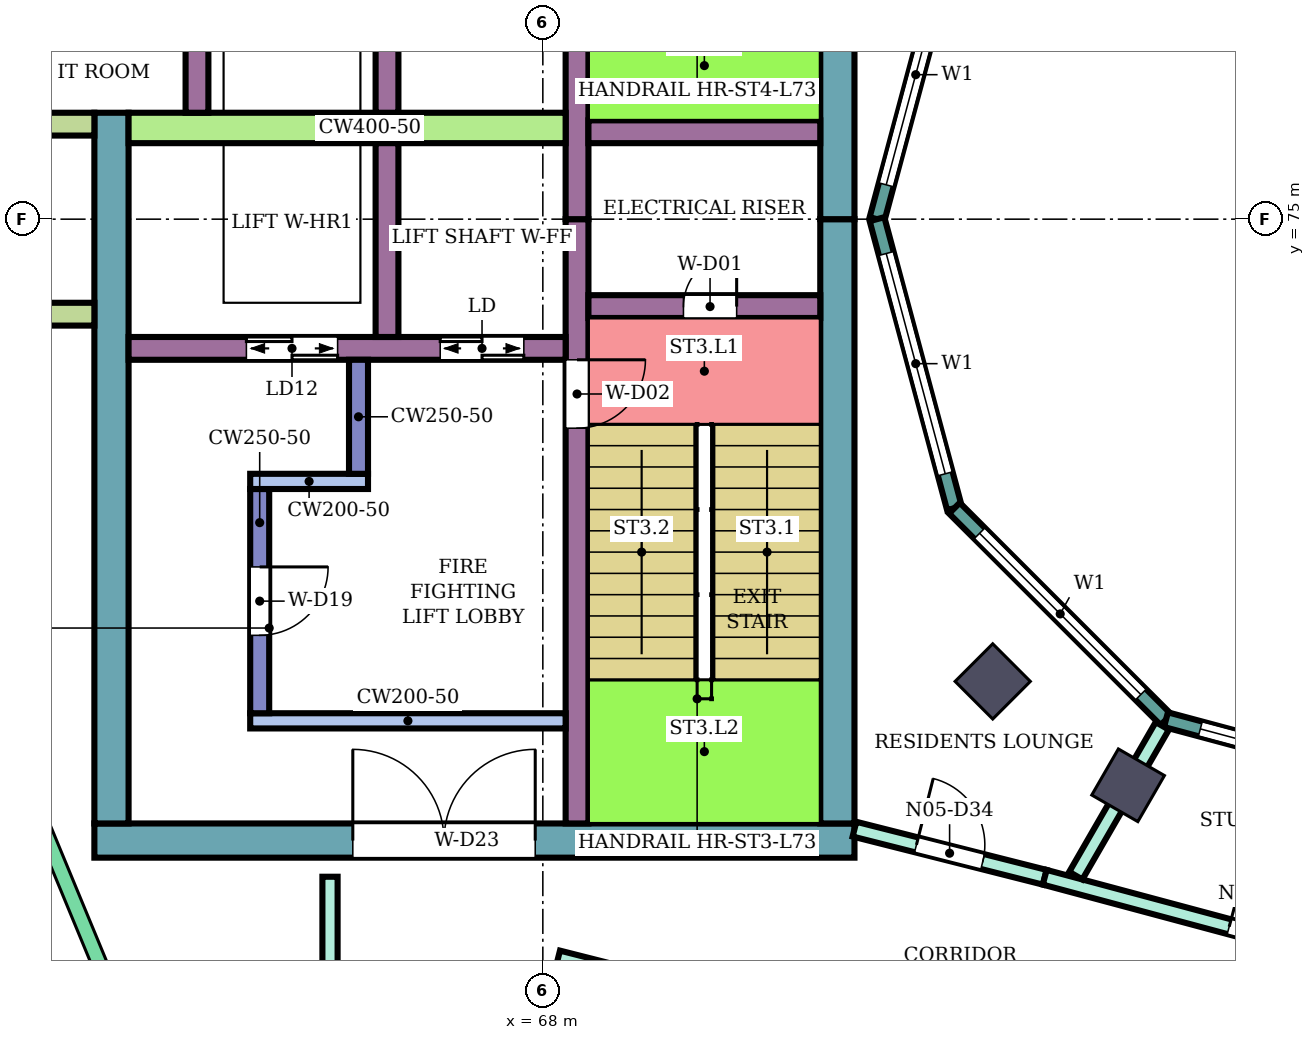
"""IFC4 building model, lengths in metres.
Left out: names, types, materials, properties, quantities, classifications, styles, units other than length and angle.
Written with IfcOpenShell. Run it as: python <this file> out.ifc"""

import sys

from ifc_helpers import new_model, si_unit, direction, frame, frame_2d, origin, origin_2d, place, context, subcontext, project, spatial, rectangle, extrude, element, fill, save


model = new_model("IFC4")
c1 = context("Model", 3, precision=1e-05, world=origin(), true_north=direction((0.0, 1.0)))
c2 = subcontext(c1, "Body", "Model", "MODEL_VIEW")
j1 = project(units=[si_unit("LENGTHUNIT", "METRE"), si_unit("PLANEANGLEUNIT", "RADIAN")], contexts=[c1])
p1 = place(None, origin())
s1 = spatial("IfcSite", under=j1, at=p1, CompositionType="ELEMENT")
p2 = place(p1, origin())
s2 = spatial("IfcBuilding", under=s1, at=p2, CompositionType="ELEMENT")
p3 = place(p2, frame((0.0, 0.0, 319.3)))
s3 = spatial("IfcBuildingStorey", under=s2, at=p3, CompositionType="ELEMENT", Elevation=319.3)
for number, where, z_axis, x_axis in (
    (1, (73.919, 68.919, 0.0), (0.0, 0.0, 1.0), (-0.707, -0.707, 0.0)),
    (2, (75.7, 67.552, 0.0), (0.0, 0.0, 1.0), (-0.5, -0.866, 0.0)),
):
    element("IfcColumn", number, at=place(p3, frame(where, z_axis=z_axis, x_axis=x_axis)), inside=s3, PredefinedType="COLUMN", context=c2, shape_type="SweptSolid", body=[
        extrude(rectangle(XDim=0.7, YDim=0.7, at=origin_2d()), origin(), (0.0, 0.0, 1.0), 4.4),
    ])
p4 = place(p3, frame((72.1, 66.825, 0.0), z_axis=(0.0, 0.0, 1.0), x_axis=(-1.0, 0.0, 0.0)))
e3 = element("IfcWall", 3, at=p4, inside=s3, PredefinedType="SHEAR", context=c2, shape_type="SweptSolid", body=[
    extrude(rectangle(XDim=10.0, YDim=0.45, at=frame_2d((5.0, 0.0))), origin(), (0.0, 0.0, 1.0), 4.08),
])
p5 = place(p4, frame((4.2, 0.0, 0.0)))
e4 = element("IfcOpeningElement", 4, at=p5, cuts=e3, PredefinedType="OPENING", context=c2, shape_type="SweptSolid", body=[
    extrude(rectangle(XDim=2.4, YDim=2.4, at=frame_2d((1.2, 1.2))), frame((0.0, 0.235, 0.0), z_axis=(0.0, -1.0, 0.0), x_axis=(1.0, 0.0, 0.0)), (0.0, 0.0, 1.0), 0.47),
])
for number, where, z_axis, x_axis in (
    (5, (71.875, 75.0, 0.0), (0.0, 0.0, 1.0), (0.0, -1.0, 0.0)),
    (6, (71.875, 82.95, 0.0), (0.0, 0.0, 1.0), (0.0, -1.0, 0.0)),
):
    element("IfcWall", number, at=place(p3, frame(where, z_axis=z_axis, x_axis=x_axis)), inside=s3, PredefinedType="SHEAR", context=c2, shape_type="SweptSolid", body=[
        extrude(rectangle(XDim=7.95, YDim=0.45, at=frame_2d((3.975, 0.0))), origin(), (0.0, 0.0, 1.0), 4.08),
    ])
p6 = place(p3, frame((62.325, 76.4, 0.0), z_axis=(0.0, 0.0, 1.0), x_axis=(0.0, -1.0, 0.0)))
e7 = element("IfcWall", 7, at=p6, inside=s3, PredefinedType="SHEAR", context=c2, shape_type="SweptSolid", body=[
    extrude(rectangle(XDim=9.35, YDim=0.45, at=frame_2d((4.675, 0.0))), origin(), (0.0, 0.0, 1.0), 4.08),
])
p7 = place(p3, frame((68.45, 75.0, 0.0), z_axis=(0.0, 0.0, 1.0), x_axis=(0.0, -1.0, 0.0)))
e8 = element("IfcWall", 8, at=p7, inside=s3, PredefinedType="SHEAR", context=c2, shape_type="SweptSolid", body=[
    extrude(rectangle(XDim=7.95, YDim=0.3, at=frame_2d((3.975, 0.0))), origin(), (0.0, 0.0, 1.0), 4.08),
])
p8 = place(p7, frame((1.85, 0.0, 0.0)))
e9 = element("IfcOpeningElement", 9, at=p8, cuts=e8, PredefinedType="OPENING", context=c2, shape_type="SweptSolid", body=[
    extrude(rectangle(XDim=0.9, YDim=2.1, at=frame_2d((0.45, 1.05))), frame((0.0, 0.16, 0.0), z_axis=(0.0, -1.0, 0.0), x_axis=(1.0, 0.0, 0.0)), (0.0, 0.0, 1.0), 0.32),
])
p9 = place(p3, frame((68.45, 82.95, 0.0), z_axis=(0.0, 0.0, 1.0), x_axis=(0.0, -1.0, 0.0)))
e10 = element("IfcWall", 10, at=p9, inside=s3, PredefinedType="SHEAR", context=c2, shape_type="SweptSolid", body=[
    extrude(rectangle(XDim=7.95, YDim=0.3, at=frame_2d((3.975, 0.0))), origin(), (0.0, 0.0, 1.0), 4.08),
])
p10 = place(p9, frame((0.6, 0.0, 0.0)))
e11 = element("IfcOpeningElement", 11, at=p10, cuts=e10, PredefinedType="OPENING", context=c2, shape_type="SweptSolid", body=[
    extrude(rectangle(XDim=0.9, YDim=2.1, at=frame_2d((0.45, 1.05))), frame((0.0, 0.16, 0.0), z_axis=(0.0, -1.0, 0.0), x_axis=(1.0, 0.0, 0.0)), (0.0, 0.0, 1.0), 0.32),
])
p11 = place(p3, frame((71.65, 73.85, 0.0), z_axis=(0.0, 0.0, 1.0), x_axis=(-1.0, 0.0, 0.0)))
e12 = element("IfcWall", 12, at=p11, inside=s3, PredefinedType="SHEAR", context=c2, shape_type="SweptSolid", body=[
    extrude(rectangle(XDim=3.05, YDim=0.3, at=frame_2d((1.525, 0.0))), origin(), (0.0, 0.0, 1.0), 4.08),
])
p12 = place(p11, frame((1.1, 0.0, 0.0)))
e13 = element("IfcOpeningElement", 13, at=p12, cuts=e12, PredefinedType="OPENING", context=c2, shape_type="SweptSolid", body=[
    extrude(rectangle(XDim=0.7, YDim=2.0, at=frame_2d((0.35, 1.0))), frame((0.0, 0.16, 0.0), z_axis=(0.0, -1.0, 0.0), x_axis=(1.0, 0.0, 0.0)), (0.0, 0.0, 1.0), 0.32),
])
p13 = place(p3, frame((71.65, 76.15, 0.0), z_axis=(0.0, 0.0, 1.0), x_axis=(-1.0, 0.0, 0.0)))
e14 = element("IfcWall", 14, at=p13, inside=s3, PredefinedType="SHEAR", context=c2, shape_type="SweptSolid", body=[
    extrude(rectangle(XDim=3.05, YDim=0.3, at=frame_2d((1.525, 0.0))), origin(), (0.0, 0.0, 1.0), 4.08),
])
p14 = place(p3, frame((68.3, 73.3, 0.0), z_axis=(0.0, 0.0, 1.0), x_axis=(-1.0, 0.0, 0.0)))
e15 = element("IfcWall", 15, at=p14, inside=s3, PredefinedType="SHEAR", context=c2, shape_type="SweptSolid", body=[
    extrude(rectangle(XDim=5.75, YDim=0.3, at=frame_2d((2.875, 0.0))), origin(), (0.0, 0.0, 1.0), 4.08),
])
p15 = place(p14, frame((0.55, 0.0, 0.0)))
e16 = element("IfcOpeningElement", 16, at=p15, cuts=e15, PredefinedType="OPENING", context=c2, shape_type="SweptSolid", body=[
    extrude(rectangle(XDim=1.1, YDim=2.1, at=frame_2d((0.55, 1.05))), frame((0.0, 0.16, 0.0), z_axis=(0.0, -1.0, 0.0), x_axis=(1.0, 0.0, 0.0)), (0.0, 0.0, 1.0), 0.32),
])
p16 = place(p14, frame((3.0, 0.0, 0.0)))
e17 = element("IfcOpeningElement", 17, at=p16, cuts=e15, PredefinedType="OPENING", context=c2, shape_type="SweptSolid", body=[
    extrude(rectangle(XDim=1.2, YDim=2.1, at=frame_2d((0.6, 1.05))), frame((0.0, 0.16, 0.0), z_axis=(0.0, -1.0, 0.0), x_axis=(1.0, 0.0, 0.0)), (0.0, 0.0, 1.0), 0.32),
])
p17 = place(p3, frame((68.3, 76.2, 0.0), z_axis=(0.0, 0.0, 1.0), x_axis=(-1.0, 0.0, 0.0)))
e18 = element("IfcWall", 18, at=p17, inside=s3, PredefinedType="SHEAR", context=c2, shape_type="SweptSolid", body=[
    extrude(rectangle(XDim=5.75, YDim=0.4, at=frame_2d((2.875, 0.0))), origin(), (0.0, 0.0, 1.0), 4.08),
])
for number, where, z_axis, x_axis in (
    (19, (65.95, 76.0, 0.0), (0.0, 0.0, 1.0), (0.0, -1.0, 0.0)),
    (20, (65.95, 78.95, 0.0), (0.0, 0.0, 1.0), (0.0, -1.0, 0.0)),
    (21, (63.45, 78.95, 0.0), (0.0, 0.0, 1.0), (0.0, -1.0, 0.0)),
):
    element("IfcWall", number, at=place(p3, frame(where, z_axis=z_axis, x_axis=x_axis)), inside=s3, PredefinedType="SHEAR", context=c2, shape_type="SweptSolid", body=[
        extrude(rectangle(XDim=2.55, YDim=0.3, at=frame_2d((1.275, 0.0))), origin(), (0.0, 0.0, 1.0), 4.08),
    ])
p18 = place(p3, frame((68.3, 68.4, 0.0), z_axis=(0.0, 0.0, 1.0), x_axis=(-1.0, 0.0, 0.0)))
e22 = element("IfcWall", 22, at=p18, inside=s3, PredefinedType="SHEAR", context=c2, shape_type="SweptSolid", body=[
    extrude(rectangle(XDim=4.15, YDim=0.2, at=frame_2d((2.075, 0.0))), origin(), (0.0, 0.0, 1.0), 4.08),
])
p19 = place(p3, frame((64.275, 71.45, 0.0), z_axis=(0.0, 0.0, 1.0), x_axis=(0.0, -1.0, 0.0)))
e23 = element("IfcWall", 23, at=p19, inside=s3, PredefinedType="SHEAR", context=c2, shape_type="SweptSolid", body=[
    extrude(rectangle(XDim=2.95, YDim=0.25, at=frame_2d((1.475, 0.0))), origin(), (0.0, 0.0, 1.0), 4.08),
])
p20 = place(p19, frame((1.025, 0.0, 0.0)))
e24 = element("IfcOpeningElement", 24, at=p20, cuts=e23, PredefinedType="OPENING", context=c2, shape_type="SweptSolid", body=[
    extrude(rectangle(XDim=0.9, YDim=2.1, at=frame_2d((0.45, 1.05))), frame((0.0, 0.135, 0.0), z_axis=(0.0, -1.0, 0.0), x_axis=(1.0, 0.0, 0.0)), (0.0, 0.0, 1.0), 0.27),
])
p21 = place(p3, frame((65.7, 71.55, 0.0), z_axis=(0.0, 0.0, 1.0), x_axis=(-1.0, 0.0, 0.0)))
e25 = element("IfcWall", 25, at=p21, inside=s3, PredefinedType="SHEAR", context=c2, shape_type="SweptSolid", body=[
    extrude(rectangle(XDim=1.55, YDim=0.2, at=frame_2d((0.775, 0.0))), origin(), (0.0, 0.0, 1.0), 4.08),
])
p22 = place(p3, frame((65.575, 73.15, 0.0), z_axis=(0.0, 0.0, 1.0), x_axis=(0.0, -1.0, 0.0)))
e26 = element("IfcWall", 26, at=p22, inside=s3, PredefinedType="SHEAR", context=c2, shape_type="SweptSolid", body=[
    extrude(rectangle(XDim=1.5, YDim=0.25, at=frame_2d((0.75, 0.0))), origin(), (0.0, 0.0, 1.0), 4.08),
])
for number, where, z_axis, x_axis in (
    (27, (62.1, 76.25, 0.0), (0.0, 0.0, 1.0), (-1.0, 0.0, 0.0)),
    (28, (62.1, 73.75, 0.0), (0.0, 0.0, 1.0), (-1.0, 0.0, 0.0)),
):
    element("IfcWall", number, at=place(p3, frame(where, z_axis=z_axis, x_axis=x_axis)), inside=s3, PredefinedType="NOTDEFINED", context=c2, shape_type="SweptSolid", body=[
        extrude(rectangle(XDim=2.416, YDim=0.3, at=frame_2d((1.208, 0.0))), origin(), (0.0, 0.0, 1.0), 4.4),
    ])
p23 = place(p3, frame((73.415, 78.802, 0.0), z_axis=(0.0, 0.0, 1.0), x_axis=(-0.258789828301, -0.965933654434, 0.0)))
e29 = element("IfcWall", 29, at=p23, inside=s3, PredefinedType="NOTDEFINED", context=c2, shape_type="SweptSolid", body=[
    extrude(rectangle(XDim=3.936, YDim=0.2, at=frame_2d((1.968, 0.0))), origin(), (0.0, 0.0, 1.0), 4.4),
])
p24 = place(p23, frame((0.468, 0.0, 0.9)))
e30 = element("IfcOpeningElement", 30, at=p24, cuts=e29, PredefinedType="OPENING", context=c2, shape_type="SweptSolid", body=[
    extrude(rectangle(XDim=3.0, YDim=2.3, at=frame_2d((1.5, 1.15))), frame((0.0, 0.11, 0.0), z_axis=(0.0, -1.0, 0.0), x_axis=(1.0, 0.0, 0.0)), (0.0, 0.0, 1.0), 0.22),
])
p25 = place(p3, frame((72.396, 75.0, 0.0), z_axis=(0.0, 0.0, 1.0), x_axis=(0.258789828301, -0.965933654434, 0.0)))
e31 = element("IfcWall", 31, at=p25, inside=s3, PredefinedType="NOTDEFINED", context=c2, shape_type="SweptSolid", body=[
    extrude(rectangle(XDim=3.936, YDim=0.2, at=frame_2d((1.968, 0.0))), origin(), (0.0, 0.0, 1.0), 4.4),
])
p26 = place(p25, frame((0.468, 0.0, 0.9)))
e32 = element("IfcOpeningElement", 32, at=p26, cuts=e31, PredefinedType="OPENING", context=c2, shape_type="SweptSolid", body=[
    extrude(rectangle(XDim=3.0, YDim=2.3, at=frame_2d((1.5, 1.15))), frame((0.0, 0.11, 0.0), z_axis=(0.0, -1.0, 0.0), x_axis=(1.0, 0.0, 0.0)), (0.0, 0.0, 1.0), 0.22),
])
p27 = place(p3, frame((73.415, 71.198, 0.0), z_axis=(0.0, 0.0, 1.0), x_axis=(0.707106781187, -0.707106781187, 0.0)))
e33 = element("IfcWall", 33, at=p27, inside=s3, PredefinedType="NOTDEFINED", context=c2, shape_type="SweptSolid", body=[
    extrude(rectangle(XDim=3.936, YDim=0.2, at=frame_2d((1.968, 0.0))), origin(), (0.0, 0.0, 1.0), 4.4),
])
p28 = place(p27, frame((0.468, 0.0, 0.9)))
e34 = element("IfcOpeningElement", 34, at=p28, cuts=e33, PredefinedType="OPENING", context=c2, shape_type="SweptSolid", body=[
    extrude(rectangle(XDim=3.0, YDim=2.3, at=frame_2d((1.5, 1.15))), frame((0.0, 0.11, 0.0), z_axis=(0.0, -1.0, 0.0), x_axis=(1.0, 0.0, 0.0)), (0.0, 0.0, 1.0), 0.22),
])
p29 = place(p3, frame((76.198, 68.415, 0.0), z_axis=(0.0, 0.0, 1.0), x_axis=(0.965933654434, -0.258789828301, 0.0)))
e35 = element("IfcWall", 35, at=p29, inside=s3, PredefinedType="NOTDEFINED", context=c2, shape_type="SweptSolid", body=[
    extrude(rectangle(XDim=3.936, YDim=0.2, at=frame_2d((1.968, 0.0))), origin(), (0.0, 0.0, 1.0), 4.4),
])
p30 = place(p29, frame((0.468, 0.0, 0.9)))
e36 = element("IfcOpeningElement", 36, at=p30, cuts=e35, PredefinedType="OPENING", context=c2, shape_type="SweptSolid", body=[
    extrude(rectangle(XDim=3.0, YDim=2.3, at=frame_2d((1.5, 1.15))), frame((0.0, 0.11, 0.0), z_axis=(0.0, -1.0, 0.0), x_axis=(1.0, 0.0, 0.0)), (0.0, 0.0, 1.0), 0.22),
])
p31 = place(p3, frame((65.2, 65.2, 0.0), z_axis=(0.0, 0.0, 1.0), x_axis=(0.0, 1.0, 0.0)))
e37 = element("IfcWall", 37, at=p31, inside=s3, PredefinedType="PARTITIONING", context=c2, shape_type="SweptSolid", body=[
    extrude(rectangle(XDim=1.149, YDim=0.2, at=frame_2d((0.575, 0.0))), origin(), (0.0, 0.0, 1.0), 3.95),
])
p32 = place(p3, frame((68.201, 65.28, 0.0), z_axis=(0.0, 0.0, 1.0), x_axis=(0.969421088032, -0.245403247897, 0.0)))
e38 = element("IfcWall", 38, at=p32, inside=s3, PredefinedType="PARTITIONING", context=c2, shape_type="SweptSolid", body=[
    extrude(rectangle(XDim=5.927, YDim=0.2, at=frame_2d((2.964, 0.0))), origin(), (0.0, 0.0, 1.0), 3.95),
])
p33 = place(p3, frame((72.1, 66.975, 0.0), z_axis=(0.0, 0.0, 1.0), x_axis=(0.969471314457, -0.245204752086, 0.0)))
e39 = element("IfcWall", 39, at=p33, inside=s3, PredefinedType="PARTITIONING", context=c2, shape_type="SweptSolid", body=[
    extrude(rectangle(XDim=2.582, YDim=0.2, at=frame_2d((1.291, 0.0))), origin(), (0.0, 0.0, 1.0), 3.95),
])
p34 = place(p33, frame((0.841, 0.0, 0.0)))
e40 = element("IfcOpeningElement", 40, at=p34, cuts=e39, PredefinedType="OPENING", context=c2, shape_type="SweptSolid", body=[
    extrude(rectangle(XDim=0.9, YDim=2.1, at=frame_2d((0.45, 1.05))), frame((0.0, 0.11, 0.0), z_axis=(0.0, -1.0, 0.0), x_axis=(1.0, 0.0, 0.0)), (0.0, 0.0, 1.0), 0.22),
])
p35 = place(p3, frame((74.603, 66.342, 0.0), z_axis=(0.0, 0.0, 1.0), x_axis=(0.965920893652, -0.258837453254, 0.0)))
e41 = element("IfcWall", 41, at=p35, inside=s3, PredefinedType="PARTITIONING", context=c2, shape_type="SweptSolid", body=[
    extrude(rectangle(XDim=5.458, YDim=0.2, at=frame_2d((2.729, 0.0))), origin(), (0.0, 0.0, 1.0), 3.95),
])
p36 = place(p35, frame((2.512, 0.0, 0.0)))
e42 = element("IfcOpeningElement", 42, at=p36, cuts=e41, PredefinedType="OPENING", context=c2, shape_type="SweptSolid", body=[
    extrude(rectangle(XDim=0.9, YDim=2.1, at=frame_2d((0.45, 1.05))), frame((0.0, 0.11, 0.0), z_axis=(0.0, -1.0, 0.0), x_axis=(1.0, 0.0, 0.0)), (0.0, 0.0, 1.0), 0.22),
])
p37 = place(p3, frame((75.012, 66.363, 0.0), z_axis=(0.0, 0.0, 1.0), x_axis=(0.500143511652, 0.865942531438, 0.0)))
e43 = element("IfcWall", 43, at=p37, inside=s3, PredefinedType="PARTITIONING", context=c2, shape_type="SweptSolid", body=[
    extrude(rectangle(XDim=2.275, YDim=0.2, at=frame_2d((1.138, 0.0))), origin(), (0.0, 0.0, 1.0), 3.95),
])
p38 = place(p24, origin())
e44 = element("IfcWindow", 44, at=p38, inside=s3, PartitioningType="SINGLE_PANEL", PredefinedType="WINDOW", context=c2, shape_type="SweptSolid", body=[
    extrude(rectangle(XDim=3.0, YDim=2.3, at=frame_2d((1.5, 1.15))), frame((0.0, 0.03, 0.0), z_axis=(0.0, -1.0, 0.0), x_axis=(1.0, 0.0, 0.0)), (0.0, 0.0, 1.0), 0.06),
])
fill(e30, e44)
p39 = place(p26, origin())
e45 = element("IfcWindow", 45, at=p39, inside=s3, PartitioningType="SINGLE_PANEL", PredefinedType="WINDOW", context=c2, shape_type="SweptSolid", body=[
    extrude(rectangle(XDim=3.0, YDim=2.3, at=frame_2d((1.5, 1.15))), frame((0.0, 0.03, 0.0), z_axis=(0.0, -1.0, 0.0), x_axis=(1.0, 0.0, 0.0)), (0.0, 0.0, 1.0), 0.06),
])
fill(e32, e45)
p40 = place(p28, origin())
e46 = element("IfcWindow", 46, at=p40, inside=s3, PartitioningType="SINGLE_PANEL", PredefinedType="WINDOW", context=c2, shape_type="SweptSolid", body=[
    extrude(rectangle(XDim=3.0, YDim=2.3, at=frame_2d((1.5, 1.15))), frame((0.0, 0.03, 0.0), z_axis=(0.0, -1.0, 0.0), x_axis=(1.0, 0.0, 0.0)), (0.0, 0.0, 1.0), 0.06),
])
fill(e34, e46)
p41 = place(p30, origin())
e47 = element("IfcWindow", 47, at=p41, inside=s3, PartitioningType="SINGLE_PANEL", PredefinedType="WINDOW", context=c2, shape_type="SweptSolid", body=[
    extrude(rectangle(XDim=3.0, YDim=2.3, at=frame_2d((1.5, 1.15))), frame((0.0, 0.03, 0.0), z_axis=(0.0, -1.0, 0.0), x_axis=(1.0, 0.0, 0.0)), (0.0, 0.0, 1.0), 0.06),
])
fill(e36, e47)
p42 = place(p36, origin())
e48 = element("IfcDoor", 48, at=p42, inside=s3, OperationType="SINGLE_SWING_LEFT", PredefinedType="DOOR", context=c2, shape_type="SweptSolid", body=[
    extrude(rectangle(XDim=0.9, YDim=2.1, at=frame_2d((0.45, 1.05))), frame((0.0, 0.025, 0.0), z_axis=(0.0, -1.0, 0.0), x_axis=(1.0, 0.0, 0.0)), (0.0, 0.0, 1.0), 0.05),
])
fill(e42, e48)
p43 = place(p34, origin())
e49 = element("IfcDoor", 49, at=p43, inside=s3, OperationType="SINGLE_SWING_LEFT", PredefinedType="DOOR", context=c2, shape_type="SweptSolid", body=[
    extrude(rectangle(XDim=0.9, YDim=2.1, at=frame_2d((0.45, 1.05))), frame((0.0, 0.025, 0.0), z_axis=(0.0, -1.0, 0.0), x_axis=(1.0, 0.0, 0.0)), (0.0, 0.0, 1.0), 0.05),
])
fill(e40, e49)
p44 = place(p12, frame((0.7, 0.0, 0.0), z_axis=(0.0, 0.0, 1.0), x_axis=(-1.0, 0.0, 0.0)))
e50 = element("IfcDoor", 50, at=p44, inside=s3, OperationType="SINGLE_SWING_RIGHT", PredefinedType="DOOR", context=c2, shape_type="SweptSolid", body=[
    extrude(rectangle(XDim=0.7, YDim=2.0, at=frame_2d((0.35, 1.0))), frame((0.0, 0.025, 0.0), z_axis=(0.0, -1.0, 0.0), x_axis=(1.0, 0.0, 0.0)), (0.0, 0.0, 1.0), 0.05),
])
fill(e13, e50)
p45 = place(p8, origin())
e51 = element("IfcDoor", 51, at=p45, inside=s3, OperationType="SINGLE_SWING_LEFT", PredefinedType="DOOR", context=c2, shape_type="SweptSolid", body=[
    extrude(rectangle(XDim=0.9, YDim=2.1, at=frame_2d((0.45, 1.05))), frame((0.0, 0.025, 0.0), z_axis=(0.0, -1.0, 0.0), x_axis=(1.0, 0.0, 0.0)), (0.0, 0.0, 1.0), 0.05),
])
fill(e9, e51)
p46 = place(p15, origin())
e52 = element("IfcDoor", 52, at=p46, inside=s3, OperationType="DOUBLE_DOOR_SLIDING", PredefinedType="DOOR", context=c2, shape_type="SweptSolid", body=[
    extrude(rectangle(XDim=1.1, YDim=2.1, at=frame_2d((0.55, 1.05))), frame((0.0, 0.025, 0.0), z_axis=(0.0, -1.0, 0.0), x_axis=(1.0, 0.0, 0.0)), (0.0, 0.0, 1.0), 0.05),
])
fill(e16, e52)
p47 = place(p16, origin())
e53 = element("IfcDoor", 53, at=p47, inside=s3, OperationType="DOUBLE_DOOR_SLIDING", PredefinedType="DOOR", context=c2, shape_type="SweptSolid", body=[
    extrude(rectangle(XDim=1.2, YDim=2.1, at=frame_2d((0.6, 1.05))), frame((0.0, 0.025, 0.0), z_axis=(0.0, -1.0, 0.0), x_axis=(1.0, 0.0, 0.0)), (0.0, 0.0, 1.0), 0.05),
])
fill(e17, e53)
p48 = place(p20, origin())
e54 = element("IfcDoor", 54, at=p48, inside=s3, OperationType="SINGLE_SWING_LEFT", PredefinedType="DOOR", context=c2, shape_type="SweptSolid", body=[
    extrude(rectangle(XDim=0.9, YDim=2.1, at=frame_2d((0.45, 1.05))), frame((0.0, 0.025, 0.0), z_axis=(0.0, -1.0, 0.0), x_axis=(1.0, 0.0, 0.0)), (0.0, 0.0, 1.0), 0.05),
])
fill(e24, e54)
p49 = place(p5, frame((2.4, 0.0, 0.0), z_axis=(0.0, 0.0, 1.0), x_axis=(-1.0, 0.0, 0.0)))
e55 = element("IfcDoor", 55, at=p49, inside=s3, OperationType="DOUBLE_DOOR_SINGLE_SWING", PredefinedType="DOOR", context=c2, shape_type="SweptSolid", body=[
    extrude(rectangle(XDim=2.4, YDim=2.4, at=frame_2d((1.2, 1.2))), frame((0.0, 0.025, 0.0), z_axis=(0.0, -1.0, 0.0), x_axis=(1.0, 0.0, 0.0)), (0.0, 0.0, 1.0), 0.05),
])
fill(e4, e55)
save(model, sys.argv[1])
